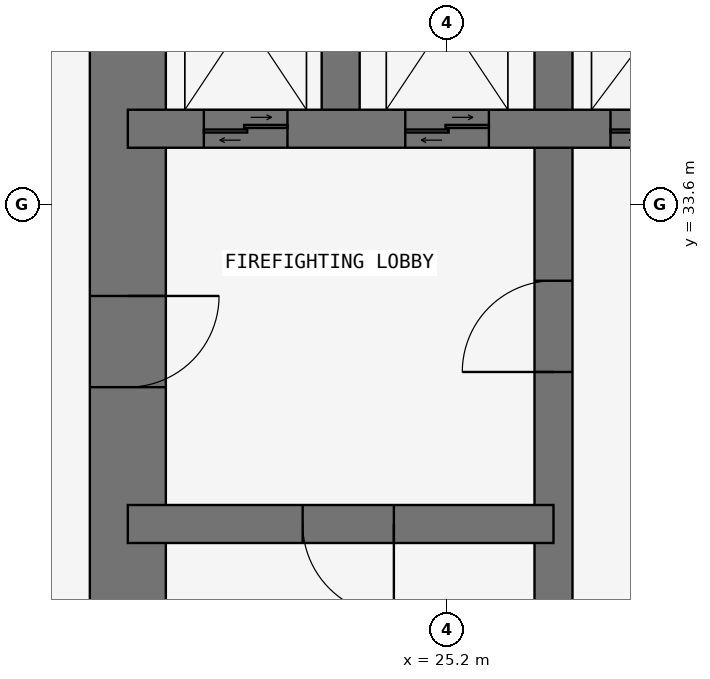
"""IFC4 building model, lengths in metres.
Left out: names, types, materials, properties, quantities, classifications, styles, units other than length and angle.
Written with IfcOpenShell. Run it as: python <this file> out.ifc"""

import sys

from ifc_helpers import new_model, si_unit, direction, frame, frame_2d, origin, place, context, subcontext, project, spatial, rectangle, extrude, element, fill, save


model = new_model("IFC4")
c1 = context("Model", 3, precision=1e-05, world=origin(), true_north=direction((0.0, 1.0)))
c2 = subcontext(c1, "Body", "Model", "MODEL_VIEW")
j1 = project(units=[si_unit("LENGTHUNIT", "METRE"), si_unit("PLANEANGLEUNIT", "RADIAN")], contexts=[c1])
p1 = place(None, origin())
s1 = spatial("IfcSite", under=j1, at=p1, CompositionType="ELEMENT")
p2 = place(p1, origin())
s2 = spatial("IfcBuilding", under=s1, at=p2, CompositionType="ELEMENT")
p3 = place(p2, frame((0.0, 0.0, 74.1)))
s3 = spatial("IfcBuildingStorey", under=s2, at=p3, CompositionType="ELEMENT", Elevation=74.1)
p4 = place(p3, frame((21.0, 37.8, 0.0), z_axis=(0.0, 0.0, 1.0), x_axis=(0.0, -1.0, 0.0)))
e1 = element("IfcWall", 1, at=p4, inside=s3, PredefinedType="SHEAR", context=c2, shape_type="SweptSolid", body=[
    extrude(rectangle(XDim=17.3, YDim=1.0, at=frame_2d((8.65, 0.0))), origin(), (0.0, 0.0, 1.0), 3.6),
])
p5 = place(p4, frame((5.4, 0.0, 0.0)))
e2 = element("IfcOpeningElement", 2, at=p5, cuts=e1, PredefinedType="OPENING", context=c2, shape_type="SweptSolid", body=[
    extrude(rectangle(XDim=1.2, YDim=2.1, at=frame_2d((0.6, 1.05))), frame((0.0, 0.51, 0.0), z_axis=(0.0, -1.0, 0.0), x_axis=(1.0, 0.0, 0.0)), (0.0, 0.0, 1.0), 1.02),
])
p6 = place(p3, frame((26.6, 21.0, 0.0), z_axis=(0.0, 0.0, 1.0), x_axis=(0.0, 1.0, 0.0)))
e3 = element("IfcWall", 3, at=p6, inside=s3, PredefinedType="SHEAR", context=c2, shape_type="SweptSolid", body=[
    extrude(rectangle(XDim=16.8, YDim=0.5, at=frame_2d((8.4, 0.0))), origin(), (0.0, 0.0, 1.0), 3.6),
])
p7 = place(p6, frame((10.4, 0.0, 0.0)))
e4 = element("IfcOpeningElement", 4, at=p7, cuts=e3, PredefinedType="OPENING", context=c2, shape_type="SweptSolid", body=[
    extrude(rectangle(XDim=1.2, YDim=2.1, at=frame_2d((0.6, 1.05))), frame((0.0, 0.26, 0.0), z_axis=(0.0, -1.0, 0.0), x_axis=(1.0, 0.0, 0.0)), (0.0, 0.0, 1.0), 0.52),
])
p8 = place(p3, frame((21.0, 29.4, 0.0), z_axis=(0.0, 0.0, 1.0), x_axis=(1.0, 0.0, 0.0)))
e5 = element("IfcWall", 5, at=p8, inside=s3, PredefinedType="SHEAR", context=c2, shape_type="SweptSolid", body=[
    extrude(rectangle(XDim=5.6, YDim=0.5, at=frame_2d((2.8, 0.0))), origin(), (0.0, 0.0, 1.0), 3.6),
])
p9 = place(p8, frame((2.3, 0.0, 0.0)))
e6 = element("IfcOpeningElement", 6, at=p9, cuts=e5, PredefinedType="OPENING", context=c2, shape_type="SweptSolid", body=[
    extrude(rectangle(XDim=1.2, YDim=2.1, at=frame_2d((0.6, 1.05))), frame((0.0, 0.26, 0.0), z_axis=(0.0, -1.0, 0.0), x_axis=(1.0, 0.0, 0.0)), (0.0, 0.0, 1.0), 0.52),
])
p10 = place(p3, frame((21.0, 34.6, 0.0), z_axis=(0.0, 0.0, 1.0), x_axis=(1.0, 0.0, 0.0)))
e7 = element("IfcWall", 7, at=p10, inside=s3, PredefinedType="SHEAR", context=c2, shape_type="SweptSolid", body=[
    extrude(rectangle(XDim=11.2, YDim=0.5, at=frame_2d((5.6, 0.0))), origin(), (0.0, 0.0, 1.0), 3.6),
])
p11 = place(p10, frame((9.35, 0.0, 0.0)))
e8 = element("IfcOpeningElement", 8, at=p11, cuts=e7, PredefinedType="OPENING", context=c2, shape_type="SweptSolid", body=[
    extrude(rectangle(XDim=0.9, YDim=2.1, at=frame_2d((0.45, 1.05))), frame((0.0, 0.26, 0.0), z_axis=(0.0, -1.0, 0.0), x_axis=(1.0, 0.0, 0.0)), (0.0, 0.0, 1.0), 0.52),
])
p12 = place(p10, frame((1.0, 0.0, 0.0)))
e9 = element("IfcOpeningElement", 9, at=p12, cuts=e7, PredefinedType="OPENING", context=c2, shape_type="SweptSolid", body=[
    extrude(rectangle(XDim=1.1, YDim=2.1, at=frame_2d((0.55, 1.05))), frame((0.0, 0.26, 0.0), z_axis=(0.0, -1.0, 0.0), x_axis=(1.0, 0.0, 0.0)), (0.0, 0.0, 1.0), 0.52),
])
p13 = place(p10, frame((3.65, 0.0, 0.0)))
e10 = element("IfcOpeningElement", 10, at=p13, cuts=e7, PredefinedType="OPENING", context=c2, shape_type="SweptSolid", body=[
    extrude(rectangle(XDim=1.1, YDim=2.1, at=frame_2d((0.55, 1.05))), frame((0.0, 0.26, 0.0), z_axis=(0.0, -1.0, 0.0), x_axis=(1.0, 0.0, 0.0)), (0.0, 0.0, 1.0), 0.52),
])
p14 = place(p10, frame((6.35, 0.0, 0.0)))
e11 = element("IfcOpeningElement", 11, at=p14, cuts=e7, PredefinedType="OPENING", context=c2, shape_type="SweptSolid", body=[
    extrude(rectangle(XDim=1.3, YDim=2.1, at=frame_2d((0.65, 1.05))), frame((0.0, 0.26, 0.0), z_axis=(0.0, -1.0, 0.0), x_axis=(1.0, 0.0, 0.0)), (0.0, 0.0, 1.0), 0.52),
])
p15 = place(p3, frame((23.8, 34.6, 0.0), z_axis=(0.0, 0.0, 1.0), x_axis=(0.0, 1.0, 0.0)))
e12 = element("IfcWall", 12, at=p15, inside=s3, PredefinedType="SHEAR", context=c2, shape_type="SweptSolid", body=[
    extrude(rectangle(XDim=3.2, YDim=0.5, at=frame_2d((1.6, 0.0))), origin(), (0.0, 0.0, 1.0), 3.6),
])
p16 = place(p5, origin())
e13 = element("IfcDoor", 13, at=p16, inside=s3, OperationType="SINGLE_SWING_LEFT", PredefinedType="DOOR", context=c2, shape_type="SweptSolid", body=[
    extrude(rectangle(XDim=1.2, YDim=2.1, at=frame_2d((0.6, 1.05))), frame((0.0, 0.025, 0.0), z_axis=(0.0, -1.0, 0.0), x_axis=(1.0, 0.0, 0.0)), (0.0, 0.0, 1.0), 0.05),
])
fill(e2, e13)
p17 = place(p9, frame((1.2, 0.0, 0.0), z_axis=(0.0, 0.0, 1.0), x_axis=(-1.0, 0.0, 0.0)))
e14 = element("IfcDoor", 14, at=p17, inside=s3, OperationType="SINGLE_SWING_LEFT", PredefinedType="DOOR", context=c2, shape_type="SweptSolid", body=[
    extrude(rectangle(XDim=1.2, YDim=2.1, at=frame_2d((0.6, 1.05))), frame((0.0, 0.025, 0.0), z_axis=(0.0, -1.0, 0.0), x_axis=(1.0, 0.0, 0.0)), (0.0, 0.0, 1.0), 0.05),
])
fill(e6, e14)
p18 = place(p7, origin())
e15 = element("IfcDoor", 15, at=p18, inside=s3, OperationType="SINGLE_SWING_LEFT", PredefinedType="DOOR", context=c2, shape_type="SweptSolid", body=[
    extrude(rectangle(XDim=1.2, YDim=2.1, at=frame_2d((0.6, 1.05))), frame((0.0, 0.025, 0.0), z_axis=(0.0, -1.0, 0.0), x_axis=(1.0, 0.0, 0.0)), (0.0, 0.0, 1.0), 0.05),
])
fill(e4, e15)
p19 = place(p12, origin())
e16 = element("IfcDoor", 16, at=p19, inside=s3, OperationType="DOUBLE_DOOR_SLIDING", PredefinedType="DOOR", context=c2, shape_type="SweptSolid", body=[
    extrude(rectangle(XDim=1.1, YDim=2.1, at=frame_2d((0.55, 1.05))), frame((0.0, 0.025, 0.0), z_axis=(0.0, -1.0, 0.0), x_axis=(1.0, 0.0, 0.0)), (0.0, 0.0, 1.0), 0.05),
])
fill(e9, e16)
p20 = place(p13, origin())
e17 = element("IfcDoor", 17, at=p20, inside=s3, OperationType="DOUBLE_DOOR_SLIDING", PredefinedType="DOOR", context=c2, shape_type="SweptSolid", body=[
    extrude(rectangle(XDim=1.1, YDim=2.1, at=frame_2d((0.55, 1.05))), frame((0.0, 0.025, 0.0), z_axis=(0.0, -1.0, 0.0), x_axis=(1.0, 0.0, 0.0)), (0.0, 0.0, 1.0), 0.05),
])
fill(e10, e17)
p21 = place(p14, origin())
e18 = element("IfcDoor", 18, at=p21, inside=s3, OperationType="DOUBLE_DOOR_SLIDING", PredefinedType="DOOR", context=c2, shape_type="SweptSolid", body=[
    extrude(rectangle(XDim=1.3, YDim=2.1, at=frame_2d((0.65, 1.05))), frame((0.0, 0.025, 0.0), z_axis=(0.0, -1.0, 0.0), x_axis=(1.0, 0.0, 0.0)), (0.0, 0.0, 1.0), 0.05),
])
fill(e11, e18)
save(model, sys.argv[1])
